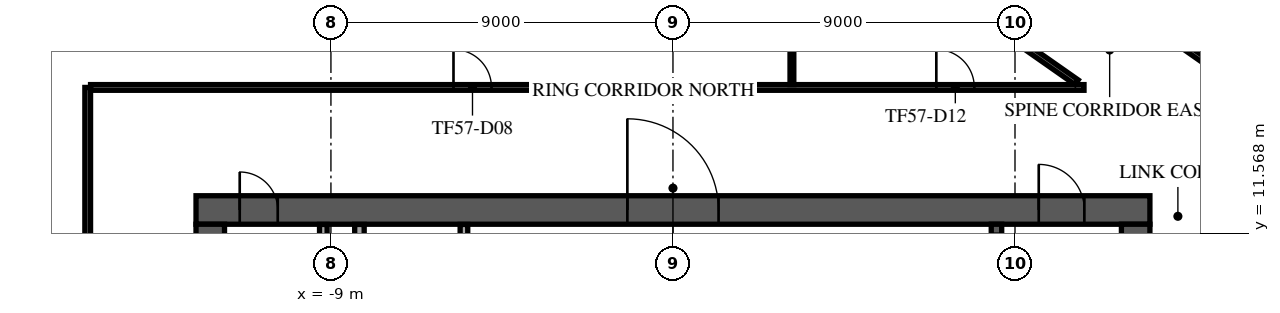
"""IFC4 building model, lengths in metres.
Left out: names, types, materials, properties, quantities, classifications, styles, units other than length and angle.
Written with IfcOpenShell. Run it as: python <this file> out.ifc"""

import sys

from ifc_helpers import new_model, si_unit, direction, frame, frame_2d, origin, place, context, subcontext, project, spatial, rectangle, extrude, element, fill, save


model = new_model("IFC4")
c1 = context("Model", 3, precision=1e-05, world=origin(), true_north=direction((0.0, 1.0)))
c2 = subcontext(c1, "Body", "Model", "MODEL_VIEW")
j1 = project(units=[si_unit("LENGTHUNIT", "METRE"), si_unit("PLANEANGLEUNIT", "RADIAN")], contexts=[c1])
p1 = place(None, origin())
s1 = spatial("IfcSite", under=j1, at=p1, CompositionType="ELEMENT")
p2 = place(p1, origin())
s2 = spatial("IfcBuilding", under=s1, at=p2, CompositionType="ELEMENT")
p3 = place(p2, frame((0.0, 0.0, 242.9)))
s3 = spatial("IfcBuildingStorey", under=s2, at=p3, CompositionType="ELEMENT", Elevation=242.9)
p4 = place(p3, frame((-12.55, 12.175, 0.0), z_axis=(0.0, 0.0, 1.0), x_axis=(1.0, 0.0, 0.0)))
e1 = element("IfcWall", 1, at=p4, inside=s3, PredefinedType="SHEAR", context=c2, shape_type="SweptSolid", body=[
    extrude(rectangle(XDim=25.1, YDim=0.75, at=frame_2d((12.55, 0.0))), origin(), (0.0, 0.0, 1.0), 3.64),
])
p5 = place(p4, frame((11.35, 0.0, 0.0)))
e2 = element("IfcOpeningElement", 2, at=p5, cuts=e1, PredefinedType="OPENING", context=c2, shape_type="SweptSolid", body=[
    extrude(rectangle(XDim=2.4, YDim=2.4, at=frame_2d((1.2, 1.2))), frame((0.0, 0.385, 0.0), z_axis=(0.0, -1.0, 0.0), x_axis=(1.0, 0.0, 0.0)), (0.0, 0.0, 1.0), 0.77),
])
p6 = place(p4, frame((22.175, 0.0, 0.0)))
e3 = element("IfcOpeningElement", 3, at=p6, cuts=e1, PredefinedType="OPENING", context=c2, shape_type="SweptSolid", body=[
    extrude(rectangle(XDim=1.2, YDim=2.1, at=frame_2d((0.6, 1.05))), frame((0.0, 0.385, 0.0), z_axis=(0.0, -1.0, 0.0), x_axis=(1.0, 0.0, 0.0)), (0.0, 0.0, 1.0), 0.77),
])
p7 = place(p4, frame((1.15, 0.0, 0.0)))
e4 = element("IfcOpeningElement", 4, at=p7, cuts=e1, PredefinedType="OPENING", context=c2, shape_type="SweptSolid", body=[
    extrude(rectangle(XDim=1.0, YDim=2.1, at=frame_2d((0.5, 1.05))), frame((0.0, 0.385, 0.0), z_axis=(0.0, -1.0, 0.0), x_axis=(1.0, 0.0, 0.0)), (0.0, 0.0, 1.0), 0.77),
])
p8 = place(p3, frame((12.175, -11.8, 0.0), z_axis=(0.0, 0.0, 1.0), x_axis=(0.0, 1.0, 0.0)))
e5 = element("IfcWall", 5, at=p8, inside=s3, PredefinedType="SHEAR", context=c2, shape_type="SweptSolid", body=[
    extrude(rectangle(XDim=23.6, YDim=0.75, at=frame_2d((11.8, 0.0))), origin(), (0.0, 0.0, 1.0), 3.64),
])
p9 = place(p8, frame((10.6, 0.0, 0.0)))
e6 = element("IfcOpeningElement", 6, at=p9, cuts=e5, PredefinedType="OPENING", context=c2, shape_type="SweptSolid", body=[
    extrude(rectangle(XDim=2.4, YDim=2.4, at=frame_2d((1.2, 1.2))), frame((0.0, 0.385, 0.0), z_axis=(0.0, -1.0, 0.0), x_axis=(1.0, 0.0, 0.0)), (0.0, 0.0, 1.0), 0.77),
])
p10 = place(p3, frame((-12.175, -11.8, 0.0), z_axis=(0.0, 0.0, 1.0), x_axis=(0.0, 1.0, 0.0)))
e7 = element("IfcWall", 7, at=p10, inside=s3, PredefinedType="SHEAR", context=c2, shape_type="SweptSolid", body=[
    extrude(rectangle(XDim=23.6, YDim=0.75, at=frame_2d((11.8, 0.0))), origin(), (0.0, 0.0, 1.0), 3.64),
])
p11 = place(p10, frame((10.6, 0.0, 0.0)))
e8 = element("IfcOpeningElement", 8, at=p11, cuts=e7, PredefinedType="OPENING", context=c2, shape_type="SweptSolid", body=[
    extrude(rectangle(XDim=2.4, YDim=2.4, at=frame_2d((1.2, 1.2))), frame((0.0, 0.385, 0.0), z_axis=(0.0, -1.0, 0.0), x_axis=(1.0, 0.0, 0.0)), (0.0, 0.0, 1.0), 0.77),
])
p12 = place(p3, frame((8.512, 4.55, 0.0), z_axis=(0.0, 0.0, 1.0), x_axis=(0.0, 1.0, 0.0)))
e9 = element("IfcWall", 9, at=p12, inside=s3, PredefinedType="SOLIDWALL", context=c2, shape_type="SweptSolid", body=[
    extrude(rectangle(XDim=7.25, YDim=0.275, at=frame_2d((3.625, 0.0))), origin(), (0.0, 0.0, 1.0), 3.64),
])
p13 = place(p12, frame((6.0, 0.0, 0.0)))
e10 = element("IfcOpeningElement", 10, at=p13, cuts=e9, PredefinedType="OPENING", context=c2, shape_type="SweptSolid", body=[
    extrude(rectangle(XDim=1.0, YDim=2.1, at=frame_2d((0.5, 1.05))), frame((0.0, 0.147, 0.0), z_axis=(0.0, -1.0, 0.0), x_axis=(1.0, 0.0, 0.0)), (0.0, 0.0, 1.0), 0.295),
])
p14 = place(p3, frame((-9.2, 4.78, 0.0), z_axis=(0.0, 0.0, 1.0), x_axis=(0.0, 1.0, 0.0)))
e11 = element("IfcWall", 11, at=p14, inside=s3, PredefinedType="PARTITIONING", context=c2, shape_type="SweptSolid", body=[
    extrude(rectangle(XDim=7.015, YDim=0.2, at=frame_2d((3.507, 0.0))), origin(), (0.0, 0.0, 1.0), 3.64),
])
p15 = place(p14, frame((2.92, 0.0, 0.0)))
e12 = element("IfcOpeningElement", 12, at=p15, cuts=e11, PredefinedType="OPENING", context=c2, shape_type="SweptSolid", body=[
    extrude(rectangle(XDim=1.0, YDim=2.1, at=frame_2d((0.5, 1.05))), frame((0.0, 0.11, 0.0), z_axis=(0.0, -1.0, 0.0), x_axis=(1.0, 0.0, 0.0)), (0.0, 0.0, 1.0), 0.22),
])
p16 = place(p3, frame((-8.25, 8.805, 0.0), z_axis=(0.0, 0.0, 1.0), x_axis=(0.0, 1.0, 0.0)))
e13 = element("IfcWall", 13, at=p16, inside=s3, PredefinedType="PARTITIONING", context=c2, shape_type="SweptSolid", body=[
    extrude(rectangle(XDim=2.99, YDim=0.25, at=frame_2d((1.495, 0.0))), origin(), (0.0, 0.0, 1.0), 3.64),
])
p17 = place(p16, frame((0.895, 0.0, 0.0)))
e14 = element("IfcOpeningElement", 14, at=p17, cuts=e13, PredefinedType="OPENING", context=c2, shape_type="SweptSolid", body=[
    extrude(rectangle(XDim=1.0, YDim=2.1, at=frame_2d((0.5, 1.05))), frame((0.0, 0.135, 0.0), z_axis=(0.0, -1.0, 0.0), x_axis=(1.0, 0.0, 0.0)), (0.0, 0.0, 1.0), 0.27),
])
p18 = place(p3, frame((-5.5, 8.805, 0.0), z_axis=(0.0, 0.0, 1.0), x_axis=(0.0, 1.0, 0.0)))
e15 = element("IfcWall", 15, at=p18, inside=s3, PredefinedType="PARTITIONING", context=c2, shape_type="SweptSolid", body=[
    extrude(rectangle(XDim=2.99, YDim=0.2, at=frame_2d((1.495, 0.0))), origin(), (0.0, 0.0, 1.0), 3.64),
])
p19 = place(p18, frame((0.532, 0.0, 0.0)))
e16 = element("IfcOpeningElement", 16, at=p19, cuts=e15, PredefinedType="OPENING", context=c2, shape_type="SweptSolid", body=[
    extrude(rectangle(XDim=1.8, YDim=2.1, at=frame_2d((0.9, 1.05))), frame((0.0, 0.11, 0.0), z_axis=(0.0, -1.0, 0.0), x_axis=(1.0, 0.0, 0.0)), (0.0, 0.0, 1.0), 0.22),
])
p20 = place(p3, frame((-5.115, 33.491, 0.0), z_axis=(0.0, 0.0, 1.0), x_axis=(-0.57357740375, -0.819151366908, 0.0)))
e17 = element("IfcWall", 17, at=p20, inside=s3, PredefinedType="STANDARD", context=c2, shape_type="SweptSolid", body=[
    extrude(rectangle(XDim=48.843, YDim=0.6, at=frame_2d((24.422, 0.0))), origin(), (0.0, 0.0, 1.0), 3.64),
])
p21 = place(p20, frame((1.22, 0.0, 0.9)))
e18 = element("IfcOpeningElement", 18, at=p21, cuts=e17, PredefinedType="OPENING", context=c2, shape_type="SweptSolid", body=[
    extrude(rectangle(XDim=2.0, YDim=2.1, at=frame_2d((1.0, 1.05))), frame((0.0, 0.31, 0.0), z_axis=(0.0, -1.0, 0.0), x_axis=(1.0, 0.0, 0.0)), (0.0, 0.0, 1.0), 0.62),
])
p22 = place(p20, frame((5.66, 0.0, 0.9)))
e19 = element("IfcOpeningElement", 19, at=p22, cuts=e17, PredefinedType="OPENING", context=c2, shape_type="SweptSolid", body=[
    extrude(rectangle(XDim=2.0, YDim=2.1, at=frame_2d((1.0, 1.05))), frame((0.0, 0.31, 0.0), z_axis=(0.0, -1.0, 0.0), x_axis=(1.0, 0.0, 0.0)), (0.0, 0.0, 1.0), 0.62),
])
p23 = place(p20, frame((10.101, 0.0, 0.9)))
e20 = element("IfcOpeningElement", 20, at=p23, cuts=e17, PredefinedType="OPENING", context=c2, shape_type="SweptSolid", body=[
    extrude(rectangle(XDim=2.0, YDim=2.1, at=frame_2d((1.0, 1.05))), frame((0.0, 0.31, 0.0), z_axis=(0.0, -1.0, 0.0), x_axis=(1.0, 0.0, 0.0)), (0.0, 0.0, 1.0), 0.62),
])
p24 = place(p20, frame((14.541, 0.0, 0.9)))
e21 = element("IfcOpeningElement", 21, at=p24, cuts=e17, PredefinedType="OPENING", context=c2, shape_type="SweptSolid", body=[
    extrude(rectangle(XDim=2.0, YDim=2.1, at=frame_2d((1.0, 1.05))), frame((0.0, 0.31, 0.0), z_axis=(0.0, -1.0, 0.0), x_axis=(1.0, 0.0, 0.0)), (0.0, 0.0, 1.0), 0.62),
])
p25 = place(p20, frame((18.981, 0.0, 0.9)))
e22 = element("IfcOpeningElement", 22, at=p25, cuts=e17, PredefinedType="OPENING", context=c2, shape_type="SweptSolid", body=[
    extrude(rectangle(XDim=2.0, YDim=2.1, at=frame_2d((1.0, 1.05))), frame((0.0, 0.31, 0.0), z_axis=(0.0, -1.0, 0.0), x_axis=(1.0, 0.0, 0.0)), (0.0, 0.0, 1.0), 0.62),
])
p26 = place(p20, frame((23.422, 0.0, 0.9)))
e23 = element("IfcOpeningElement", 23, at=p26, cuts=e17, PredefinedType="OPENING", context=c2, shape_type="SweptSolid", body=[
    extrude(rectangle(XDim=2.0, YDim=2.1, at=frame_2d((1.0, 1.05))), frame((0.0, 0.31, 0.0), z_axis=(0.0, -1.0, 0.0), x_axis=(1.0, 0.0, 0.0)), (0.0, 0.0, 1.0), 0.62),
])
p27 = place(p20, frame((27.862, 0.0, 0.9)))
e24 = element("IfcOpeningElement", 24, at=p27, cuts=e17, PredefinedType="OPENING", context=c2, shape_type="SweptSolid", body=[
    extrude(rectangle(XDim=2.0, YDim=2.1, at=frame_2d((1.0, 1.05))), frame((0.0, 0.31, 0.0), z_axis=(0.0, -1.0, 0.0), x_axis=(1.0, 0.0, 0.0)), (0.0, 0.0, 1.0), 0.62),
])
p28 = place(p20, frame((32.302, 0.0, 0.9)))
e25 = element("IfcOpeningElement", 25, at=p28, cuts=e17, PredefinedType="OPENING", context=c2, shape_type="SweptSolid", body=[
    extrude(rectangle(XDim=2.0, YDim=2.1, at=frame_2d((1.0, 1.05))), frame((0.0, 0.31, 0.0), z_axis=(0.0, -1.0, 0.0), x_axis=(1.0, 0.0, 0.0)), (0.0, 0.0, 1.0), 0.62),
])
p29 = place(p20, frame((36.742, 0.0, 0.9)))
e26 = element("IfcOpeningElement", 26, at=p29, cuts=e17, PredefinedType="OPENING", context=c2, shape_type="SweptSolid", body=[
    extrude(rectangle(XDim=2.0, YDim=2.1, at=frame_2d((1.0, 1.05))), frame((0.0, 0.31, 0.0), z_axis=(0.0, -1.0, 0.0), x_axis=(1.0, 0.0, 0.0)), (0.0, 0.0, 1.0), 0.62),
])
p30 = place(p20, frame((41.183, 0.0, 0.9)))
e27 = element("IfcOpeningElement", 27, at=p30, cuts=e17, PredefinedType="OPENING", context=c2, shape_type="SweptSolid", body=[
    extrude(rectangle(XDim=2.0, YDim=2.1, at=frame_2d((1.0, 1.05))), frame((0.0, 0.31, 0.0), z_axis=(0.0, -1.0, 0.0), x_axis=(1.0, 0.0, 0.0)), (0.0, 0.0, 1.0), 0.62),
])
p31 = place(p20, frame((45.623, 0.0, 0.9)))
e28 = element("IfcOpeningElement", 28, at=p31, cuts=e17, PredefinedType="OPENING", context=c2, shape_type="SweptSolid", body=[
    extrude(rectangle(XDim=2.0, YDim=2.1, at=frame_2d((1.0, 1.05))), frame((0.0, 0.31, 0.0), z_axis=(0.0, -1.0, 0.0), x_axis=(1.0, 0.0, 0.0)), (0.0, 0.0, 1.0), 0.62),
])
p32 = place(p3, frame((31.815, 13.98, 0.0), z_axis=(0.0, 0.0, 1.0), x_axis=(-0.819152162902, 0.573576266955, 0.0)))
e29 = element("IfcWall", 29, at=p32, inside=s3, PredefinedType="STANDARD", context=c2, shape_type="SweptSolid", body=[
    extrude(rectangle(XDim=36.243, YDim=0.6, at=frame_2d((18.122, 0.0))), origin(), (0.0, 0.0, 1.0), 3.64),
])
p33 = place(p32, frame((1.215, 0.0, 0.9)))
e30 = element("IfcOpeningElement", 30, at=p33, cuts=e29, PredefinedType="OPENING", context=c2, shape_type="SweptSolid", body=[
    extrude(rectangle(XDim=2.1, YDim=2.1, at=frame_2d((1.05, 1.05))), frame((0.0, 0.31, 0.0), z_axis=(0.0, -1.0, 0.0), x_axis=(1.0, 0.0, 0.0)), (0.0, 0.0, 1.0), 0.62),
])
p34 = place(p32, frame((5.746, 0.0, 0.9)))
e31 = element("IfcOpeningElement", 31, at=p34, cuts=e29, PredefinedType="OPENING", context=c2, shape_type="SweptSolid", body=[
    extrude(rectangle(XDim=2.1, YDim=2.1, at=frame_2d((1.05, 1.05))), frame((0.0, 0.31, 0.0), z_axis=(0.0, -1.0, 0.0), x_axis=(1.0, 0.0, 0.0)), (0.0, 0.0, 1.0), 0.62),
])
p35 = place(p32, frame((10.276, 0.0, 0.9)))
e32 = element("IfcOpeningElement", 32, at=p35, cuts=e29, PredefinedType="OPENING", context=c2, shape_type="SweptSolid", body=[
    extrude(rectangle(XDim=2.1, YDim=2.1, at=frame_2d((1.05, 1.05))), frame((0.0, 0.31, 0.0), z_axis=(0.0, -1.0, 0.0), x_axis=(1.0, 0.0, 0.0)), (0.0, 0.0, 1.0), 0.62),
])
p36 = place(p32, frame((14.806, 0.0, 0.9)))
e33 = element("IfcOpeningElement", 33, at=p36, cuts=e29, PredefinedType="OPENING", context=c2, shape_type="SweptSolid", body=[
    extrude(rectangle(XDim=2.1, YDim=2.1, at=frame_2d((1.05, 1.05))), frame((0.0, 0.31, 0.0), z_axis=(0.0, -1.0, 0.0), x_axis=(1.0, 0.0, 0.0)), (0.0, 0.0, 1.0), 0.62),
])
p37 = place(p32, frame((19.337, 0.0, 0.9)))
e34 = element("IfcOpeningElement", 34, at=p37, cuts=e29, PredefinedType="OPENING", context=c2, shape_type="SweptSolid", body=[
    extrude(rectangle(XDim=2.1, YDim=2.1, at=frame_2d((1.05, 1.05))), frame((0.0, 0.31, 0.0), z_axis=(0.0, -1.0, 0.0), x_axis=(1.0, 0.0, 0.0)), (0.0, 0.0, 1.0), 0.62),
])
p38 = place(p32, frame((23.867, 0.0, 0.9)))
e35 = element("IfcOpeningElement", 35, at=p38, cuts=e29, PredefinedType="OPENING", context=c2, shape_type="SweptSolid", body=[
    extrude(rectangle(XDim=2.1, YDim=2.1, at=frame_2d((1.05, 1.05))), frame((0.0, 0.31, 0.0), z_axis=(0.0, -1.0, 0.0), x_axis=(1.0, 0.0, 0.0)), (0.0, 0.0, 1.0), 0.62),
])
p39 = place(p32, frame((28.398, 0.0, 0.9)))
e36 = element("IfcOpeningElement", 36, at=p39, cuts=e29, PredefinedType="OPENING", context=c2, shape_type="SweptSolid", body=[
    extrude(rectangle(XDim=2.1, YDim=2.1, at=frame_2d((1.05, 1.05))), frame((0.0, 0.31, 0.0), z_axis=(0.0, -1.0, 0.0), x_axis=(1.0, 0.0, 0.0)), (0.0, 0.0, 1.0), 0.62),
])
p40 = place(p32, frame((32.928, 0.0, 0.9)))
e37 = element("IfcOpeningElement", 37, at=p40, cuts=e29, PredefinedType="OPENING", context=c2, shape_type="SweptSolid", body=[
    extrude(rectangle(XDim=2.1, YDim=2.1, at=frame_2d((1.05, 1.05))), frame((0.0, 0.31, 0.0), z_axis=(0.0, -1.0, 0.0), x_axis=(1.0, 0.0, 0.0)), (0.0, 0.0, 1.0), 0.62),
])
p41 = place(p3, frame((-15.4, -12.046, 0.0), z_axis=(0.0, 0.0, 1.0), x_axis=(0.0, 1.0, 0.0)))
e38 = element("IfcWall", 38, at=p41, inside=s3, PredefinedType="PARTITIONING", context=c2, shape_type="SweptSolid", body=[
    extrude(rectangle(XDim=27.446, YDim=0.15, at=frame_2d((13.723, 0.0))), origin(), (0.0, 0.0, 1.0), 3.24),
])
p42 = place(p41, frame((12.961, 0.0, 0.0)))
e39 = element("IfcOpeningElement", 39, at=p42, cuts=e38, PredefinedType="OPENING", context=c2, shape_type="SweptSolid", body=[
    extrude(rectangle(XDim=1.0, YDim=2.1, at=frame_2d((0.5, 1.05))), frame((0.0, 0.085, 0.0), z_axis=(0.0, -1.0, 0.0), x_axis=(1.0, 0.0, 0.0)), (0.0, 0.0, 1.0), 0.17),
])
p43 = place(p3, frame((-15.325, 15.4, 0.0), z_axis=(0.0, 0.0, 1.0), x_axis=(1.0, 0.0, 0.0)))
e40 = element("IfcWall", 40, at=p43, inside=s3, PredefinedType="PARTITIONING", context=c2, shape_type="SweptSolid", body=[
    extrude(rectangle(XDim=26.141, YDim=0.15, at=frame_2d((13.07, 0.0))), origin(), (0.0, 0.0, 1.0), 3.24),
])
p44 = place(p43, frame((9.55, 0.0, 0.0)))
e41 = element("IfcOpeningElement", 41, at=p44, cuts=e40, PredefinedType="OPENING", context=c2, shape_type="SweptSolid", body=[
    extrude(rectangle(XDim=1.0, YDim=2.1, at=frame_2d((0.5, 1.05))), frame((0.0, 0.085, 0.0), z_axis=(0.0, -1.0, 0.0), x_axis=(1.0, 0.0, 0.0)), (0.0, 0.0, 1.0), 0.17),
])
p45 = place(p43, frame((22.255, 0.0, 0.0)))
e42 = element("IfcOpeningElement", 42, at=p45, cuts=e40, PredefinedType="OPENING", context=c2, shape_type="SweptSolid", body=[
    extrude(rectangle(XDim=1.0, YDim=2.1, at=frame_2d((0.5, 1.05))), frame((0.0, 0.085, 0.0), z_axis=(0.0, -1.0, 0.0), x_axis=(1.0, 0.0, 0.0)), (0.0, 0.0, 1.0), 0.17),
])
p46 = place(p3, frame((-3.266, 25.26, 0.0), z_axis=(0.0, 0.0, 1.0), x_axis=(0.819150723298, -0.573578322917, 0.0)))
e43 = element("IfcWall", 43, at=p46, inside=s3, PredefinedType="PARTITIONING", context=c2, shape_type="SweptSolid", body=[
    extrude(rectangle(XDim=16.953, YDim=0.15, at=frame_2d((8.476, 0.0))), origin(), (0.0, 0.0, 1.0), 3.24),
])
p47 = place(p46, frame((2.55, 0.0, 0.0)))
e44 = element("IfcOpeningElement", 44, at=p47, cuts=e43, PredefinedType="OPENING", context=c2, shape_type="SweptSolid", body=[
    extrude(rectangle(XDim=1.8, YDim=2.1, at=frame_2d((0.9, 1.05))), frame((0.0, 0.085, 0.0), z_axis=(0.0, -1.0, 0.0), x_axis=(1.0, 0.0, 0.0)), (0.0, 0.0, 1.0), 0.17),
])
p48 = place(p3, frame((-1.89, 27.226, 0.0), z_axis=(0.0, 0.0, 1.0), x_axis=(0.819163235761, -0.573560452941, 0.0)))
e45 = element("IfcWall", 45, at=p48, inside=s3, PredefinedType="PARTITIONING", context=c2, shape_type="SweptSolid", body=[
    extrude(rectangle(XDim=34.403, YDim=0.15, at=frame_2d((17.202, 0.0))), origin(), (0.0, 0.0, 1.0), 3.24),
])
p49 = place(p48, frame((7.427, 0.0, 0.0)))
e46 = element("IfcOpeningElement", 46, at=p49, cuts=e45, PredefinedType="OPENING", context=c2, shape_type="SweptSolid", body=[
    extrude(rectangle(XDim=1.0, YDim=2.1, at=frame_2d((0.5, 1.05))), frame((0.0, 0.085, 0.0), z_axis=(0.0, -1.0, 0.0), x_axis=(1.0, 0.0, 0.0)), (0.0, 0.0, 1.0), 0.17),
])
p50 = place(p48, frame((15.173, 0.0, 0.0)))
e47 = element("IfcOpeningElement", 47, at=p50, cuts=e45, PredefinedType="OPENING", context=c2, shape_type="SweptSolid", body=[
    extrude(rectangle(XDim=1.0, YDim=2.1, at=frame_2d((0.5, 1.05))), frame((0.0, 0.085, 0.0), z_axis=(0.0, -1.0, 0.0), x_axis=(1.0, 0.0, 0.0)), (0.0, 0.0, 1.0), 0.17),
])
p51 = place(p48, frame((19.273, 0.0, 0.0)))
e48 = element("IfcOpeningElement", 48, at=p51, cuts=e45, PredefinedType="OPENING", context=c2, shape_type="SweptSolid", body=[
    extrude(rectangle(XDim=1.0, YDim=2.1, at=frame_2d((0.5, 1.05))), frame((0.0, 0.085, 0.0), z_axis=(0.0, -1.0, 0.0), x_axis=(1.0, 0.0, 0.0)), (0.0, 0.0, 1.0), 0.17),
])
p52 = place(p3, frame((3.13, 15.475, 0.0), z_axis=(0.0, 0.0, 1.0), x_axis=(0.0, 1.0, 0.0)))
e49 = element("IfcWall", 49, at=p52, inside=s3, PredefinedType="PARTITIONING", context=c2, shape_type="SweptSolid", body=[
    extrude(rectangle(XDim=3.731, YDim=0.1, at=frame_2d((1.865, 0.0))), origin(), (0.0, 0.0, 1.0), 3.64),
])
p53 = place(p5, origin())
e50 = element("IfcDoor", 50, at=p53, inside=s3, OperationType="SINGLE_SWING_LEFT", PredefinedType="DOOR", context=c2, shape_type="SweptSolid", body=[
    extrude(rectangle(XDim=2.4, YDim=2.4, at=frame_2d((1.2, 1.2))), frame((0.0, 0.025, 0.0), z_axis=(0.0, -1.0, 0.0), x_axis=(1.0, 0.0, 0.0)), (0.0, 0.0, 1.0), 0.05),
])
fill(e2, e50)
p54 = place(p6, origin())
e51 = element("IfcDoor", 51, at=p54, inside=s3, OperationType="SINGLE_SWING_LEFT", PredefinedType="DOOR", context=c2, shape_type="SweptSolid", body=[
    extrude(rectangle(XDim=1.2, YDim=2.1, at=frame_2d((0.6, 1.05))), frame((0.0, 0.025, 0.0), z_axis=(0.0, -1.0, 0.0), x_axis=(1.0, 0.0, 0.0)), (0.0, 0.0, 1.0), 0.05),
])
fill(e3, e51)
p55 = place(p7, origin())
e52 = element("IfcDoor", 52, at=p55, inside=s3, OperationType="SINGLE_SWING_LEFT", PredefinedType="DOOR", context=c2, shape_type="SweptSolid", body=[
    extrude(rectangle(XDim=1.0, YDim=2.1, at=frame_2d((0.5, 1.05))), frame((0.0, 0.025, 0.0), z_axis=(0.0, -1.0, 0.0), x_axis=(1.0, 0.0, 0.0)), (0.0, 0.0, 1.0), 0.05),
])
fill(e4, e52)
p56 = place(p25, origin())
e53 = element("IfcWindow", 53, at=p56, inside=s3, PartitioningType="SINGLE_PANEL", PredefinedType="WINDOW", context=c2, shape_type="SweptSolid", body=[
    extrude(rectangle(XDim=2.0, YDim=2.1, at=frame_2d((1.0, 1.05))), frame((0.0, 0.03, 0.0), z_axis=(0.0, -1.0, 0.0), x_axis=(1.0, 0.0, 0.0)), (0.0, 0.0, 1.0), 0.06),
])
fill(e22, e53)
p57 = place(p44, origin())
e54 = element("IfcDoor", 54, at=p57, inside=s3, OperationType="SINGLE_SWING_RIGHT", PredefinedType="DOOR", context=c2, shape_type="SweptSolid", body=[
    extrude(rectangle(XDim=1.0, YDim=2.1, at=frame_2d((0.5, 1.05))), frame((0.0, 0.025, 0.0), z_axis=(0.0, -1.0, 0.0), x_axis=(1.0, 0.0, 0.0)), (0.0, 0.0, 1.0), 0.05),
])
fill(e41, e54)
p58 = place(p45, origin())
e55 = element("IfcDoor", 55, at=p58, inside=s3, OperationType="SINGLE_SWING_LEFT", PredefinedType="DOOR", context=c2, shape_type="SweptSolid", body=[
    extrude(rectangle(XDim=1.0, YDim=2.1, at=frame_2d((0.5, 1.05))), frame((0.0, 0.025, 0.0), z_axis=(0.0, -1.0, 0.0), x_axis=(1.0, 0.0, 0.0)), (0.0, 0.0, 1.0), 0.05),
])
fill(e42, e55)
p59 = place(p51, origin())
e56 = element("IfcDoor", 56, at=p59, inside=s3, OperationType="SINGLE_SWING_LEFT", PredefinedType="DOOR", context=c2, shape_type="SweptSolid", body=[
    extrude(rectangle(XDim=1.0, YDim=2.1, at=frame_2d((0.5, 1.05))), frame((0.0, 0.025, 0.0), z_axis=(0.0, -1.0, 0.0), x_axis=(1.0, 0.0, 0.0)), (0.0, 0.0, 1.0), 0.05),
])
fill(e48, e56)
save(model, sys.argv[1])
